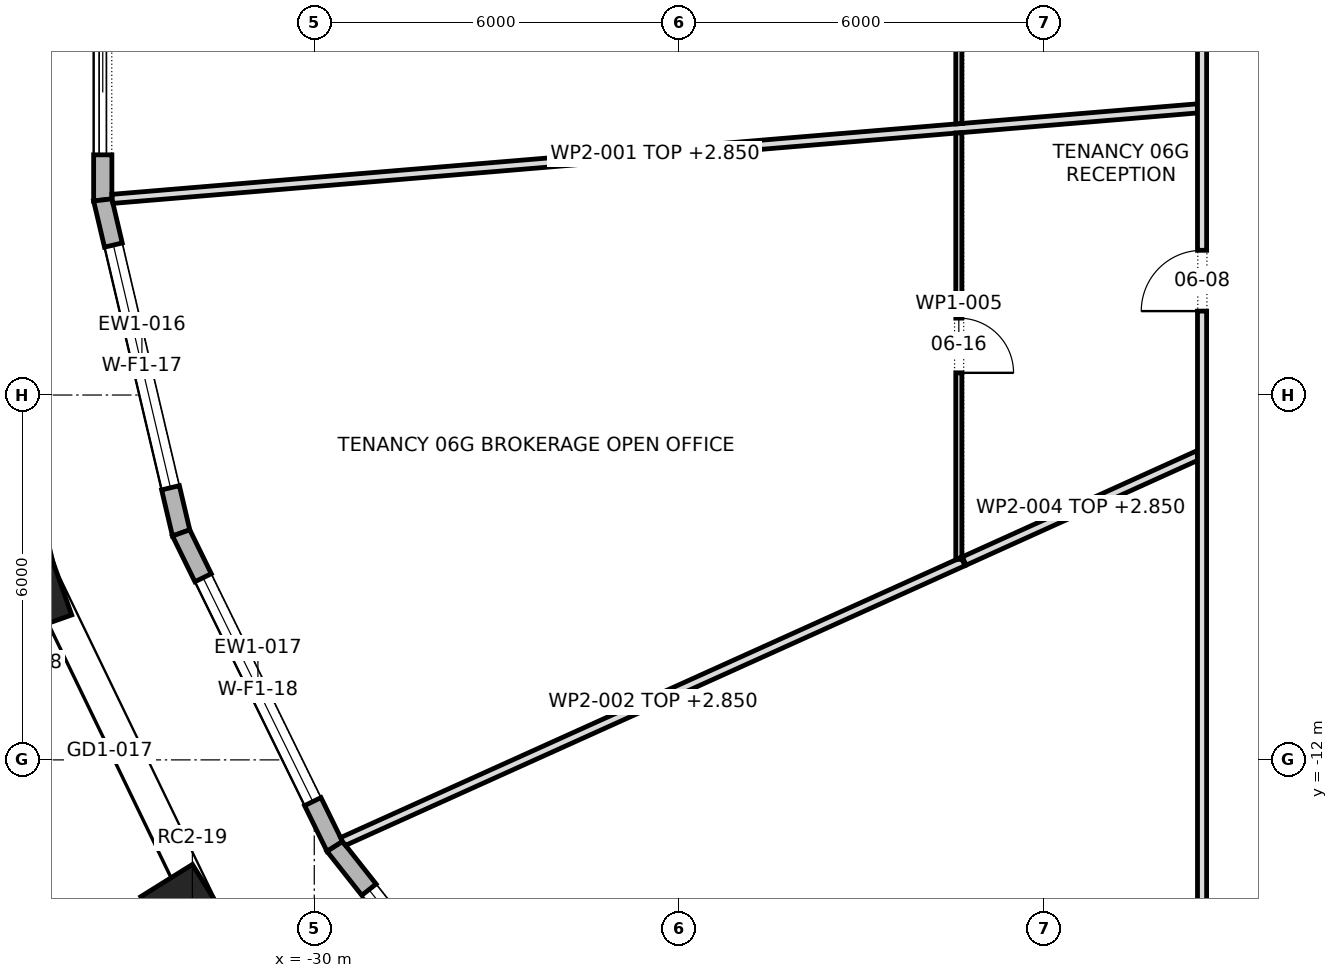
"""IFC4 building model, lengths in metres.
Left out: names, types, materials, properties, quantities, classifications, styles, units other than length and angle.
Written with IfcOpenShell. Run it as: python <this file> out.ifc"""

import sys

from ifc_helpers import new_model, si_unit, direction, frame, frame_2d, origin, origin_2d, place, context, subcontext, project, spatial, polyline, rectangle, outline, extrude, element, fill, save


model = new_model("IFC4")
c1 = context("Model", 3, precision=1e-05, world=origin(), true_north=direction((0.0, 1.0)))
c2 = subcontext(c1, "Body", "Model", "MODEL_VIEW")
j1 = project(units=[si_unit("LENGTHUNIT", "METRE"), si_unit("PLANEANGLEUNIT", "RADIAN")], contexts=[c1])
p1 = place(None, origin())
s1 = spatial("IfcSite", under=j1, at=p1, CompositionType="ELEMENT")
p2 = place(p1, origin())
s2 = spatial("IfcBuilding", under=s1, at=p2, CompositionType="ELEMENT")
p3 = place(p2, frame((0.0, 0.0, 86.5)))
s3 = spatial("IfcBuildingStorey", under=s2, at=p3, CompositionType="ELEMENT", Elevation=86.5)
for number, where, z_axis, x_axis in (
    (1, (-34.727, -9.029, 0.0), (0.0, 0.0, 1.0), (0.334, -0.943, 0.0)),
    (2, (-32.004, -14.663, 0.0), (0.0, 0.0, 1.0), (0.529, -0.849, 0.0)),
):
    element("IfcColumn", number, at=place(p3, frame(where, z_axis=z_axis, x_axis=x_axis)), inside=s3, PredefinedType="COLUMN", context=c2, shape_type="SweptSolid", body=[
        extrude(rectangle(XDim=1.6, YDim=1.0, at=origin_2d()), origin(), (0.0, 0.0, 1.0), 4.2),
    ])
p4 = place(p3, frame((-33.478, 2.792, 0.0), z_axis=(0.0, 0.0, 1.0), x_axis=(0.0, -1.0, 0.0)))
e3 = element("IfcWall", 3, at=p4, inside=s3, PredefinedType="STANDARD", context=c2, shape_type="SweptSolid", body=[
    extrude(outline(polyline([(-0.017, -0.15), (5.601, -0.15), (5.566, 0.15), (0.017, 0.15), (-0.017, -0.15)])), origin(), (0.0, 0.0, 1.0), 3.9),
])
p5 = place(p4, frame((0.742, 0.0, 0.0)))
e4 = element("IfcOpeningElement", 4, at=p5, cuts=e3, PredefinedType="OPENING", context=c2, shape_type="SweptSolid", body=[
    extrude(rectangle(XDim=4.1, YDim=3.45, at=frame_2d((2.05, 1.725))), frame((0.0, 0.162, 0.0), z_axis=(0.0, -1.0, 0.0), x_axis=(1.0, 0.0, 0.0)), (0.0, 0.0, 1.0), 0.324),
])
p6 = place(p3, frame((-33.478, -2.792, 0.0), z_axis=(0.0, 0.0, 1.0), x_axis=(0.229073200999, -0.973409198941, 0.0)))
e5 = element("IfcWall", 5, at=p6, inside=s3, PredefinedType="STANDARD", context=c2, shape_type="SweptSolid", body=[
    extrude(outline(polyline([(-0.017, -0.15), (5.642, -0.15), (5.608, 0.15), (0.017, 0.15), (-0.017, -0.15)])), origin(), (0.0, 0.0, 1.0), 3.9),
])
p7 = place(p6, frame((0.763, 0.0, 0.6)))
e6 = element("IfcOpeningElement", 6, at=p7, cuts=e5, PredefinedType="OPENING", context=c2, shape_type="SweptSolid", body=[
    extrude(rectangle(XDim=4.1, YDim=2.85, at=frame_2d((2.05, 1.425))), frame((0.0, 0.162, 0.0), z_axis=(0.0, -1.0, 0.0), x_axis=(1.0, 0.0, 0.0)), (0.0, 0.0, 1.0), 0.324),
])
p8 = place(p3, frame((-32.19, -8.267, 0.0), z_axis=(0.0, 0.0, 1.0), x_axis=(0.44010747541, -0.897945104162, 0.0)))
e7 = element("IfcWall", 7, at=p8, inside=s3, PredefinedType="STANDARD", context=c2, shape_type="SweptSolid", body=[
    extrude(outline(polyline([(-0.017, -0.15), (5.758, -0.15), (5.726, 0.15), (0.017, 0.15), (-0.017, -0.15)])), origin(), (0.0, 0.0, 1.0), 3.9),
])
p9 = place(p8, frame((0.821, 0.0, 0.6)))
e8 = element("IfcOpeningElement", 8, at=p9, cuts=e7, PredefinedType="OPENING", context=c2, shape_type="SweptSolid", body=[
    extrude(rectangle(XDim=4.1, YDim=2.85, at=frame_2d((2.05, 1.425))), frame((0.0, 0.162, 0.0), z_axis=(0.0, -1.0, 0.0), x_axis=(1.0, 0.0, 0.0)), (0.0, 0.0, 1.0), 0.324),
])
p10 = place(p3, frame((-29.663, -13.423, 0.0), z_axis=(0.0, 0.0, 1.0), x_axis=(0.620142219764, -0.784489405452, 0.0)))
e9 = element("IfcWall", 9, at=p10, inside=s3, PredefinedType="STANDARD", context=c2, shape_type="SweptSolid", body=[
    extrude(outline(polyline([(-0.016, -0.15), (5.927, -0.15), (5.897, 0.15), (0.016, 0.15), (-0.016, -0.15)])), origin(), (0.0, 0.0, 1.0), 3.9),
])
p11 = place(p10, frame((0.906, 0.0, 0.6)))
e10 = element("IfcOpeningElement", 10, at=p11, cuts=e9, PredefinedType="OPENING", context=c2, shape_type="SweptSolid", body=[
    extrude(rectangle(XDim=4.1, YDim=2.85, at=frame_2d((2.05, 1.425))), frame((0.0, 0.162, 0.0), z_axis=(0.0, -1.0, 0.0), x_axis=(1.0, 0.0, 0.0)), (0.0, 0.0, 1.0), 0.324),
])
p12 = place(p3, frame((-33.322, -2.774, 0.0), z_axis=(0.0, 0.0, 1.0), x_axis=(0.996543032046, 0.083078187757, 0.0)))
e11 = element("IfcWall", 11, at=p12, inside=s3, PredefinedType="PARTITIONING", context=c2, shape_type="SweptSolid", body=[
    extrude(outline(polyline([(0.005, -0.075), (1.991, -0.075), (3.979, -0.075), (5.966, -0.075), (7.952, -0.075), (9.939, -0.075), (11.927, -0.075), (13.913, -0.075), (13.913, -0.074), (13.919, -0.075), (15.911, -0.075), (17.902, -0.075), (17.914, 0.07), (17.914, 0.075), (15.97, 0.075), (14.026, 0.075), (14.026, 0.074), (14.017, 0.075), (12.265, 0.075), (10.512, 0.075), (8.76, 0.075), (7.008, 0.075), (5.256, 0.075), (3.504, 0.075), (1.752, 0.075), (0.0, 0.075), (0.0, -0.044), (0.005, -0.075)])), origin(), (0.0, 0.0, 1.0), 2.85),
])
p13 = place(p3, frame((-29.536, -13.346, 0.0), z_axis=(0.0, 0.0, 1.0), x_axis=(0.911414610865, 0.411489255147, 0.0)))
e12 = element("IfcWall", 12, at=p13, inside=s3, PredefinedType="PARTITIONING", context=c2, shape_type="SweptSolid", body=[
    extrude(outline(polyline([(11.208, -0.075), (11.208, 0.072), (11.194, 0.041), (11.175, 0.05), (11.175, 0.05), (11.119, 0.075), (9.266, 0.075), (7.413, 0.075), (5.56, 0.075), (3.706, 0.075), (1.853, 0.075), (0.0, 0.075), (0.0, 0.068), (0.002, 0.003), (0.021, -0.075), (1.886, -0.075), (3.75, -0.075), (5.615, -0.075), (7.479, -0.075), (9.344, -0.075), (11.208, -0.075)])), origin(), (0.0, 0.0, 1.0), 2.85),
])
p14 = place(p3, frame((-19.32, -8.734, 0.0), z_axis=(0.0, 0.0, 1.0), x_axis=(0.911074570035, 0.412241589162, 0.0)))
e13 = element("IfcWall", 13, at=p14, inside=s3, PredefinedType="PARTITIONING", context=c2, shape_type="SweptSolid", body=[
    extrude(outline(polyline([(0.0, -0.075), (1.396, -0.075), (2.791, -0.075), (4.187, -0.075), (4.255, 0.075), (2.837, 0.075), (1.419, 0.075), (0.001, 0.075), (0.0, 0.072), (0.0, -0.075)])), origin(), (0.0, 0.0, 1.0), 2.85),
])
p15 = place(p3, frame((-19.4, -8.71, 0.0), z_axis=(0.0, 0.0, 1.0), x_axis=(0.0, 1.0, 0.0)))
e14 = element("IfcWall", 14, at=p15, inside=s3, PredefinedType="PARTITIONING", context=c2, shape_type="SweptSolid", body=[
    extrude(outline(polyline([(0.041, -0.05), (0.041, -0.05), (0.044, -0.049), (0.045, -0.05), (1.79, -0.05), (3.535, -0.05), (5.28, -0.05), (7.025, -0.05), (7.025, -0.044), (7.017, 0.05), (5.263, 0.05), (3.509, 0.05), (1.754, 0.05), (0.0, 0.05), (0.0, 0.049), (0.044, -0.048), (0.041, -0.05)])), origin(), (0.0, 0.0, 1.0), 3.9),
])
p16 = place(p15, frame((3.075, 0.0, 0.0)))
e15 = element("IfcOpeningElement", 15, at=p16, cuts=e14, PredefinedType="OPENING", context=c2, shape_type="SweptSolid", body=[
    extrude(rectangle(XDim=0.9, YDim=2.1, at=frame_2d((0.45, 1.05))), frame((0.0, 0.062, 0.0), z_axis=(0.0, -1.0, 0.0), x_axis=(1.0, 0.0, 0.0)), (0.0, 0.0, 1.0), 0.124),
])
p17 = place(p3, frame((-19.4, -1.542, 0.0), z_axis=(0.0, 0.0, 1.0), x_axis=(0.0, 1.0, 0.0)))
e16 = element("IfcWall", 16, at=p17, inside=s3, PredefinedType="PARTITIONING", context=c2, shape_type="SweptSolid", body=[
    extrude(outline(polyline([(0.008, -0.05), (1.866, -0.05), (3.724, -0.05), (5.582, -0.05), (7.441, -0.05), (9.299, -0.05), (11.157, -0.05), (13.015, -0.05), (14.873, -0.05), (14.927, 0.028), (14.927, 0.027), (14.942, 0.05), (14.942, 0.05), (13.421, 0.05), (11.9, 0.05), (10.379, 0.05), (10.378, 0.048), (10.374, 0.05), (8.645, 0.05), (6.916, 0.05), (5.187, 0.05), (3.458, 0.05), (1.729, 0.05), (0.0, 0.05), (0.0, 0.045), (0.008, -0.05)])), origin(), (0.0, 0.0, 1.0), 3.9),
])
p18 = place(p17, frame((4.667, 0.0, 0.0)))
e17 = element("IfcOpeningElement", 17, at=p18, cuts=e16, PredefinedType="OPENING", context=c2, shape_type="SweptSolid", body=[
    extrude(rectangle(XDim=0.9, YDim=2.1, at=frame_2d((0.45, 1.05))), frame((0.0, 0.062, 0.0), z_axis=(0.0, -1.0, 0.0), x_axis=(1.0, 0.0, 0.0)), (0.0, 0.0, 1.0), 0.124),
])
p19 = place(p3, frame((-15.4, -15.475, 0.0), z_axis=(0.0, 0.0, 1.0), x_axis=(0.0, 1.0, 0.0)))
e18 = element("IfcWall", 18, at=p19, inside=s3, PredefinedType="PARTITIONING", context=c2, shape_type="SweptSolid", body=[
    extrude(outline(polyline([(0.15, -0.075), (2.066, -0.075), (3.981, -0.075), (5.897, -0.075), (7.812, -0.075), (9.728, -0.075), (11.644, -0.075), (13.56, -0.075), (15.475, -0.075), (17.391, -0.075), (19.306, -0.075), (21.222, -0.075), (23.138, -0.075), (25.053, -0.075), (26.969, -0.075), (28.885, -0.075), (30.8, -0.075), (30.95, 0.075), (29.016, 0.075), (27.081, 0.075), (25.147, 0.075), (23.212, 0.075), (21.278, 0.075), (19.344, 0.075), (17.409, 0.075), (15.475, 0.075), (13.541, 0.075), (11.606, 0.075), (9.672, 0.075), (7.738, 0.075), (5.803, 0.075), (3.869, 0.075), (1.935, 0.075), (0.0, 0.075), (0.15, -0.075)])), origin(), (0.0, 0.0, 1.0), 3.9),
])
p20 = place(p19, frame((19.675, 0.0, 0.0)))
e19 = element("IfcOpeningElement", 19, at=p20, cuts=e18, PredefinedType="OPENING", context=c2, shape_type="SweptSolid", body=[
    extrude(rectangle(XDim=1.0, YDim=2.1, at=frame_2d((0.5, 1.05))), frame((0.0, 0.087, 0.0), z_axis=(0.0, -1.0, 0.0), x_axis=(1.0, 0.0, 0.0)), (0.0, 0.0, 1.0), 0.174),
])
p21 = place(p19, frame((10.855, 0.0, 0.0)))
e20 = element("IfcOpeningElement", 20, at=p21, cuts=e18, PredefinedType="OPENING", context=c2, shape_type="SweptSolid", body=[
    extrude(rectangle(XDim=1.0, YDim=2.1, at=frame_2d((0.5, 1.05))), frame((0.0, 0.087, 0.0), z_axis=(0.0, -1.0, 0.0), x_axis=(1.0, 0.0, 0.0)), (0.0, 0.0, 1.0), 0.174),
])
p22 = place(p5, origin())
e21 = element("IfcDoor", 21, at=p22, inside=s3, OperationType="DOUBLE_DOOR_SLIDING", PredefinedType="DOOR", context=c2, shape_type="SweptSolid", body=[
    extrude(rectangle(XDim=4.1, YDim=3.45, at=frame_2d((2.05, 1.725))), frame((0.0, 0.025, 0.0), z_axis=(0.0, -1.0, 0.0), x_axis=(1.0, 0.0, 0.0)), (0.0, 0.0, 1.0), 0.05),
])
fill(e4, e21)
p23 = place(p7, origin())
e22 = element("IfcWindow", 22, at=p23, inside=s3, PartitioningType="TRIPLE_PANEL_VERTICAL", PredefinedType="WINDOW", context=c2, shape_type="SweptSolid", body=[
    extrude(rectangle(XDim=4.1, YDim=2.85, at=frame_2d((2.05, 1.425))), frame((0.0, 0.03, 0.0), z_axis=(0.0, -1.0, 0.0), x_axis=(1.0, 0.0, 0.0)), (0.0, 0.0, 1.0), 0.06),
])
fill(e6, e22)
p24 = place(p9, origin())
e23 = element("IfcWindow", 23, at=p24, inside=s3, PartitioningType="TRIPLE_PANEL_VERTICAL", PredefinedType="WINDOW", context=c2, shape_type="SweptSolid", body=[
    extrude(rectangle(XDim=4.1, YDim=2.85, at=frame_2d((2.05, 1.425))), frame((0.0, 0.03, 0.0), z_axis=(0.0, -1.0, 0.0), x_axis=(1.0, 0.0, 0.0)), (0.0, 0.0, 1.0), 0.06),
])
fill(e8, e23)
p25 = place(p11, origin())
e24 = element("IfcWindow", 24, at=p25, inside=s3, PartitioningType="TRIPLE_PANEL_VERTICAL", PredefinedType="WINDOW", context=c2, shape_type="SweptSolid", body=[
    extrude(rectangle(XDim=4.1, YDim=2.85, at=frame_2d((2.05, 1.425))), frame((0.0, 0.03, 0.0), z_axis=(0.0, -1.0, 0.0), x_axis=(1.0, 0.0, 0.0)), (0.0, 0.0, 1.0), 0.06),
])
fill(e10, e24)
p26 = place(p21, origin())
e25 = element("IfcDoor", 25, at=p26, inside=s3, OperationType="SINGLE_SWING_RIGHT", PredefinedType="DOOR", context=c2, shape_type="SweptSolid", body=[
    extrude(rectangle(XDim=1.0, YDim=2.1, at=frame_2d((0.5, 1.05))), frame((0.0, 0.025, 0.0), z_axis=(0.0, -1.0, 0.0), x_axis=(1.0, 0.0, 0.0)), (0.0, 0.0, 1.0), 0.05),
])
fill(e20, e25)
p27 = place(p16, frame((0.9, 0.0, 0.0), z_axis=(0.0, 0.0, 1.0), x_axis=(-1.0, 0.0, 0.0)))
e26 = element("IfcDoor", 26, at=p27, inside=s3, OperationType="SINGLE_SWING_LEFT", PredefinedType="DOOR", context=c2, shape_type="SweptSolid", body=[
    extrude(rectangle(XDim=0.9, YDim=2.1, at=frame_2d((0.45, 1.05))), frame((0.0, 0.025, 0.0), z_axis=(0.0, -1.0, 0.0), x_axis=(1.0, 0.0, 0.0)), (0.0, 0.0, 1.0), 0.05),
])
fill(e15, e26)
save(model, sys.argv[1])
